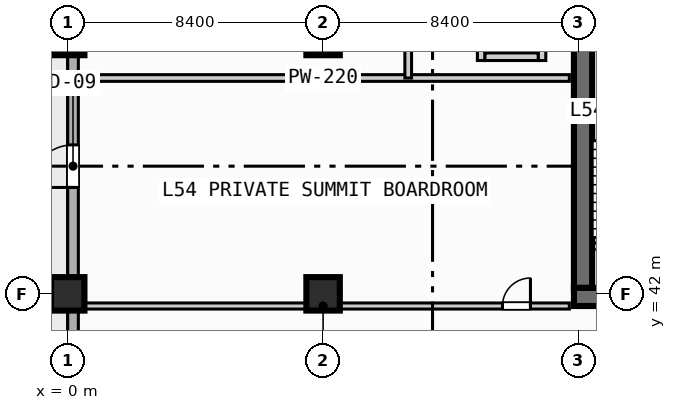
"""IFC4 building model, lengths in metres.
Left out: names, types, materials, properties, quantities, classifications, styles, units other than length and angle.
Written with IfcOpenShell. Run it as: python <this file> out.ifc"""

import sys

from ifc_helpers import new_model, si_unit, direction, frame, frame_2d, origin, origin_2d, place, context, subcontext, project, spatial, rectangle, extrude, element, fill, save


model = new_model("IFC4")
c1 = context("Model", 3, precision=1e-05, world=origin(), true_north=direction((0.0, 1.0)))
c2 = subcontext(c1, "Body", "Model", "MODEL_VIEW")
j1 = project(units=[si_unit("LENGTHUNIT", "METRE"), si_unit("PLANEANGLEUNIT", "RADIAN")], contexts=[c1])
p1 = place(None, origin())
s1 = spatial("IfcSite", under=j1, at=p1, CompositionType="ELEMENT")
p2 = place(p1, origin())
s2 = spatial("IfcBuilding", under=s1, at=p2, CompositionType="ELEMENT")
p3 = place(p2, frame((0.0, 0.0, 219.8)))
s3 = spatial("IfcBuildingStorey", under=s2, at=p3, CompositionType="ELEMENT", Elevation=219.8)
p4 = place(p3, frame((16.65, 41.9, 0.0), z_axis=(0.0, 0.0, 1.0), x_axis=(1.0, 0.0, 0.0)))
e1 = element("IfcWall", 1, at=p4, inside=s3, PredefinedType="SHEAR", context=c2, shape_type="SweptSolid", body=[
    extrude(rectangle(XDim=1.35, YDim=0.6, at=frame_2d((0.675, 0.0))), origin(), (0.0, 0.0, 1.0), 3.97),
])
p5 = place(p3, frame((16.95, 42.2, 0.0), z_axis=(0.0, 0.0, 1.0), x_axis=(0.0, 1.0, 0.0)))
e2 = element("IfcWall", 2, at=p5, inside=s3, PredefinedType="SHEAR", context=c2, shape_type="SweptSolid", body=[
    extrude(rectangle(XDim=16.35, YDim=0.6, at=frame_2d((8.175, 0.0))), origin(), (0.0, 0.0, 1.0), 3.97),
])
for number, where, z_axis, x_axis in (
    (3, (0.0, 42.0, 0.0), (0.0, 0.0, 1.0), (1.0, 0.0, 0.0)),
    (4, (0.0, 50.4, 0.0), (0.0, 0.0, 1.0), (1.0, 0.0, 0.0)),
    (5, (8.4, 42.0, 0.0), (0.0, 0.0, 1.0), (1.0, 0.0, 0.0)),
    (6, (8.4, 50.4, 0.0), (0.0, 0.0, 1.0), (1.0, 0.0, 0.0)),
):
    element("IfcColumn", number, at=place(p3, frame(where, z_axis=z_axis, x_axis=x_axis)), inside=s3, PredefinedType="COLUMN", context=c2, shape_type="SweptSolid", body=[
        extrude(rectangle(XDim=1.1, YDim=1.1, at=origin_2d()), origin(), (0.0, 0.0, 1.0), 4.2),
    ])
p6 = place(p3, frame((0.175, 3.175, 0.0), z_axis=(0.0, 0.0, 1.0), x_axis=(0.0, 1.0, 0.0)))
e7 = element("IfcWall", 7, at=p6, inside=s3, PredefinedType="STANDARD", context=c2, shape_type="SweptSolid", body=[
    extrude(rectangle(XDim=69.25, YDim=0.35, at=frame_2d((34.625, 0.0))), origin(), (0.0, 0.0, 1.0), 3.97),
])
p7 = place(p6, frame((42.325, 0.0, 0.0)))
e8 = element("IfcOpeningElement", 8, at=p7, cuts=e7, PredefinedType="OPENING", context=c2, shape_type="SweptSolid", body=[
    extrude(rectangle(XDim=1.4, YDim=2.2, at=frame_2d((0.7, 1.1))), frame((0.0, 0.185, 0.0), z_axis=(0.0, -1.0, 0.0), x_axis=(1.0, 0.0, 0.0)), (0.0, 0.0, 1.0), 0.37),
])
p8 = place(p6, frame((8.175, 0.0, 0.85)))
e9 = element("IfcOpeningElement", 9, at=p8, cuts=e7, PredefinedType="OPENING", context=c2, shape_type="SweptSolid", body=[
    extrude(rectangle(XDim=2.5, YDim=2.2, at=frame_2d((1.25, 1.1))), frame((0.0, 0.185, 0.0), z_axis=(0.0, -1.0, 0.0), x_axis=(1.0, 0.0, 0.0)), (0.0, 0.0, 1.0), 0.37),
])
p9 = place(p6, frame((16.575, 0.0, 0.85)))
e10 = element("IfcOpeningElement", 10, at=p9, cuts=e7, PredefinedType="OPENING", context=c2, shape_type="SweptSolid", body=[
    extrude(rectangle(XDim=2.5, YDim=2.2, at=frame_2d((1.25, 1.1))), frame((0.0, 0.185, 0.0), z_axis=(0.0, -1.0, 0.0), x_axis=(1.0, 0.0, 0.0)), (0.0, 0.0, 1.0), 0.37),
])
p10 = place(p6, frame((24.975, 0.0, 0.85)))
e11 = element("IfcOpeningElement", 11, at=p10, cuts=e7, PredefinedType="OPENING", context=c2, shape_type="SweptSolid", body=[
    extrude(rectangle(XDim=2.5, YDim=2.2, at=frame_2d((1.25, 1.1))), frame((0.0, 0.185, 0.0), z_axis=(0.0, -1.0, 0.0), x_axis=(1.0, 0.0, 0.0)), (0.0, 0.0, 1.0), 0.37),
])
p11 = place(p6, frame((33.375, 0.0, 0.85)))
e12 = element("IfcOpeningElement", 12, at=p11, cuts=e7, PredefinedType="OPENING", context=c2, shape_type="SweptSolid", body=[
    extrude(rectangle(XDim=2.5, YDim=2.2, at=frame_2d((1.25, 1.1))), frame((0.0, 0.185, 0.0), z_axis=(0.0, -1.0, 0.0), x_axis=(1.0, 0.0, 0.0)), (0.0, 0.0, 1.0), 0.37),
])
p12 = place(p3, frame((13.6, 49.675, 0.0), z_axis=(0.0, 0.0, 1.0), x_axis=(0.0, 1.0, 0.0)))
e13 = element("IfcWall", 13, at=p12, inside=s3, PredefinedType="SOLIDWALL", context=c2, shape_type="SweptSolid", body=[
    extrude(rectangle(XDim=2.75, YDim=0.25, at=frame_2d((1.375, 0.0))), origin(), (0.0, 0.0, 1.0), 3.97),
])
p13 = place(p12, frame((0.4, 0.0, 0.0)))
e14 = element("IfcOpeningElement", 14, at=p13, cuts=e13, PredefinedType="OPENING", context=c2, shape_type="SweptSolid", body=[
    extrude(rectangle(XDim=1.1, YDim=2.15, at=frame_2d((0.55, 1.075))), frame((0.0, 0.135, 0.0), z_axis=(0.0, -1.0, 0.0), x_axis=(1.0, 0.0, 0.0)), (0.0, 0.0, 1.0), 0.27),
])
p14 = place(p3, frame((15.6, 49.675, 0.0), z_axis=(0.0, 0.0, 1.0), x_axis=(0.0, 1.0, 0.0)))
e15 = element("IfcWall", 15, at=p14, inside=s3, PredefinedType="SOLIDWALL", context=c2, shape_type="SweptSolid", body=[
    extrude(rectangle(XDim=2.75, YDim=0.25, at=frame_2d((1.375, 0.0))), origin(), (0.0, 0.0, 1.0), 3.97),
])
p15 = place(p3, frame((13.725, 49.8, 0.0), z_axis=(0.0, 0.0, 1.0), x_axis=(1.0, 0.0, 0.0)))
e16 = element("IfcWall", 16, at=p15, inside=s3, PredefinedType="SOLIDWALL", context=c2, shape_type="SweptSolid", body=[
    extrude(rectangle(XDim=1.75, YDim=0.25, at=frame_2d((0.875, 0.0))), origin(), (0.0, 0.0, 1.0), 3.97),
])
p16 = place(p3, frame((0.3, 41.6, 0.0), z_axis=(0.0, 0.0, 1.0), x_axis=(1.0, 0.0, 0.0)))
e17 = element("IfcWall", 17, at=p16, inside=s3, PredefinedType="PARTITIONING", context=c2, shape_type="SweptSolid", body=[
    extrude(rectangle(XDim=16.2, YDim=0.2, at=frame_2d((8.1, 0.0))), origin(), (0.0, 0.0, 1.0), 3.97),
])
p17 = place(p16, frame((14.0, 0.0, 0.0)))
e18 = element("IfcOpeningElement", 18, at=p17, cuts=e17, PredefinedType="OPENING", context=c2, shape_type="SweptSolid", body=[
    extrude(rectangle(XDim=0.92, YDim=2.1, at=frame_2d((0.46, 1.05))), frame((0.0, 0.11, 0.0), z_axis=(0.0, -1.0, 0.0), x_axis=(1.0, 0.0, 0.0)), (0.0, 0.0, 1.0), 0.22),
])
p18 = place(p3, frame((0.3, 49.1, 0.0), z_axis=(0.0, 0.0, 1.0), x_axis=(1.0, 0.0, 0.0)))
e19 = element("IfcWall", 19, at=p18, inside=s3, PredefinedType="PARTITIONING", context=c2, shape_type="SweptSolid", body=[
    extrude(rectangle(XDim=16.2, YDim=0.22, at=frame_2d((8.1, 0.0))), origin(), (0.0, 0.0, 1.0), 3.97),
])
p19 = place(p3, frame((11.2, 49.1, 0.0), z_axis=(0.0, 0.0, 1.0), x_axis=(0.0, 1.0, 0.0)))
e20 = element("IfcWall", 20, at=p19, inside=s3, PredefinedType="PARTITIONING", context=c2, shape_type="SweptSolid", body=[
    extrude(rectangle(XDim=9.3, YDim=0.22, at=frame_2d((4.65, 0.0))), origin(), (0.0, 0.0, 1.0), 3.97),
])
p20 = place(p7, origin())
e21 = element("IfcDoor", 21, at=p20, inside=s3, OperationType="SINGLE_SWING_LEFT", PredefinedType="DOOR", context=c2, shape_type="SweptSolid", body=[
    extrude(rectangle(XDim=1.4, YDim=2.2, at=frame_2d((0.7, 1.1))), frame((0.0, 0.025, 0.0), z_axis=(0.0, -1.0, 0.0), x_axis=(1.0, 0.0, 0.0)), (0.0, 0.0, 1.0), 0.05),
])
fill(e8, e21)
p21 = place(p17, origin())
e22 = element("IfcDoor", 22, at=p21, inside=s3, OperationType="SINGLE_SWING_RIGHT", PredefinedType="DOOR", context=c2, shape_type="SweptSolid", body=[
    extrude(rectangle(XDim=0.92, YDim=2.1, at=frame_2d((0.46, 1.05))), frame((0.0, 0.025, 0.0), z_axis=(0.0, -1.0, 0.0), x_axis=(1.0, 0.0, 0.0)), (0.0, 0.0, 1.0), 0.05),
])
fill(e18, e22)
save(model, sys.argv[1])
